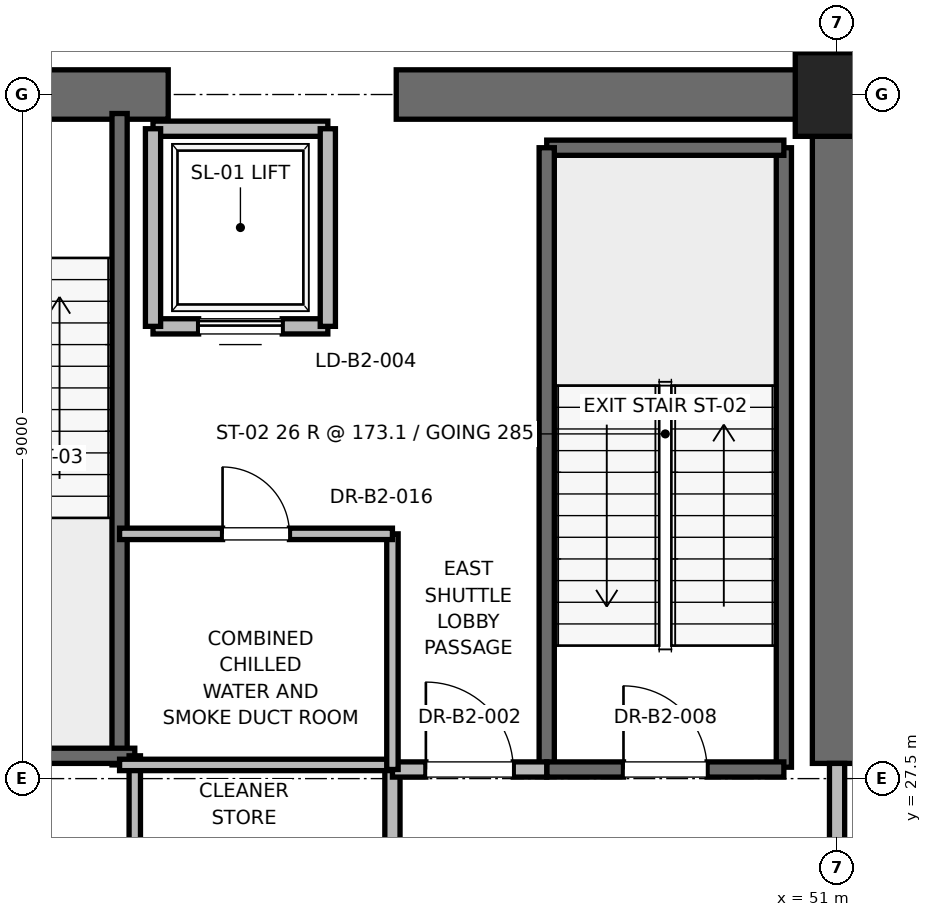
"""IFC4 building model, lengths in metres.
Left out: names, types, materials, properties, quantities, classifications, styles, units other than length and angle.
Written with IfcOpenShell. Run it as: python <this file> out.ifc"""

import sys

from ifc_helpers import new_model, si_unit, direction, frame, frame_2d, origin, origin_2d, place, context, subcontext, project, spatial, rectangle, extrude, element, fill, save


model = new_model("IFC4")
c1 = context("Model", 3, precision=1e-05, world=origin(), true_north=direction((0.0, 1.0)))
c2 = subcontext(c1, "Body", "Model", "MODEL_VIEW")
j1 = project(units=[si_unit("LENGTHUNIT", "METRE"), si_unit("PLANEANGLEUNIT", "RADIAN")], contexts=[c1])
p1 = place(None, origin())
s1 = spatial("IfcSite", under=j1, at=p1, CompositionType="ELEMENT")
p2 = place(p1, origin())
s2 = spatial("IfcBuilding", under=s1, at=p2, CompositionType="ELEMENT")
p3 = place(p2, frame((0.0, 0.0, -9.0)))
s3 = spatial("IfcBuildingStorey", under=s2, at=p3, CompositionType="ELEMENT", Elevation=-9.0)
p4 = place(p3, frame((51.0, 36.5, -0.3), z_axis=(0.0, 0.0, 1.0), x_axis=(1.0, 0.0, 0.0)))
e1 = element("IfcColumn", 1, at=p4, inside=s3, PredefinedType="PILASTER", context=c2, shape_type="SweptSolid", body=[
    extrude(rectangle(XDim=1.1, YDim=1.1, at=origin_2d()), origin(), (0.0, 0.0, 1.0), 4.8),
])
p5 = place(p3, frame((37.8, 36.5, -0.3), z_axis=(0.0, 0.0, 1.0), x_axis=(1.0, 0.0, 0.0)))
e2 = element("IfcWall", 2, at=p5, inside=s3, PredefinedType="SHEAR", context=c2, shape_type="SweptSolid", body=[
    extrude(rectangle(XDim=4.4, YDim=0.65, at=frame_2d((2.2, 0.0))), origin(), (0.0, 0.0, 1.0), 4.5),
])
p6 = place(p5, frame((1.65, 0.0, 0.3)))
e3 = element("IfcOpeningElement", 3, at=p6, cuts=e2, PredefinedType="OPENING", context=c2, shape_type="SweptSolid", body=[
    extrude(rectangle(XDim=1.1, YDim=2.15, at=frame_2d((0.55, 1.075))), frame((0.0, 0.325, 0.0), z_axis=(0.0, -1.0, 0.0), x_axis=(1.0, 0.0, 0.0)), (0.0, 0.0, 1.0), 0.65),
])
p7 = place(p3, frame((45.2, 36.5, -0.3), z_axis=(0.0, 0.0, 1.0), x_axis=(1.0, 0.0, 0.0)))
e4 = element("IfcWall", 4, at=p7, inside=s3, PredefinedType="SHEAR", context=c2, shape_type="SweptSolid", body=[
    extrude(rectangle(XDim=5.8, YDim=0.65, at=frame_2d((2.9, 0.0))), origin(), (0.0, 0.0, 1.0), 4.5),
])
p8 = place(p3, frame((51.0, 27.7, -0.3), z_axis=(0.0, 0.0, 1.0), x_axis=(0.0, 1.0, 0.0)))
e5 = element("IfcWall", 5, at=p8, inside=s3, PredefinedType="SHEAR", context=c2, shape_type="SweptSolid", body=[
    extrude(rectangle(XDim=8.8, YDim=0.65, at=frame_2d((4.4, 0.0))), origin(), (0.0, 0.0, 1.0), 4.5),
])
p9 = place(p3, frame((50.3, 27.65, -0.3), z_axis=(0.0, 0.0, 1.0), x_axis=(0.0, 1.0, 0.0)))
e6 = element("IfcWall", 6, at=p9, inside=s3, PredefinedType="SOLIDWALL", context=c2, shape_type="SweptSolid", body=[
    extrude(rectangle(XDim=8.15, YDim=0.2, at=frame_2d((4.075, 0.0))), origin(), (0.0, 0.0, 1.0), 4.5),
])
p10 = place(p3, frame((47.18, 35.8, -0.3), z_axis=(0.0, 0.0, 1.0), x_axis=(1.0, 0.0, 0.0)))
e7 = element("IfcWall", 7, at=p10, inside=s3, PredefinedType="SOLIDWALL", context=c2, shape_type="SweptSolid", body=[
    extrude(rectangle(XDim=3.12, YDim=0.2, at=frame_2d((1.56, 0.0))), origin(), (0.0, 0.0, 1.0), 4.5),
])
p11 = place(p3, frame((47.18, 27.62, -0.3), z_axis=(0.0, 0.0, 1.0), x_axis=(0.0, 1.0, 0.0)))
e8 = element("IfcWall", 8, at=p11, inside=s3, PredefinedType="SOLIDWALL", context=c2, shape_type="SweptSolid", body=[
    extrude(rectangle(XDim=8.18, YDim=0.2, at=frame_2d((4.09, 0.0))), origin(), (0.0, 0.0, 1.0), 4.5),
])
p12 = place(p3, frame((47.18, 27.62, -0.3), z_axis=(0.0, 0.0, 1.0), x_axis=(1.0, 0.0, 0.0)))
e9 = element("IfcWall", 9, at=p12, inside=s3, PredefinedType="SOLIDWALL", context=c2, shape_type="SweptSolid", body=[
    extrude(rectangle(XDim=3.12, YDim=0.2, at=frame_2d((1.56, 0.0))), origin(), (0.0, 0.0, 1.0), 4.5),
])
p13 = place(p12, frame((1.01, 0.0, 0.3)))
e10 = element("IfcOpeningElement", 10, at=p13, cuts=e9, PredefinedType="OPENING", context=c2, shape_type="SweptSolid", body=[
    extrude(rectangle(XDim=1.1, YDim=2.15, at=frame_2d((0.55, 1.075))), frame((0.0, 0.1, 0.0), z_axis=(0.0, -1.0, 0.0), x_axis=(1.0, 0.0, 0.0)), (0.0, 0.0, 1.0), 0.2),
])
p14 = place(p3, frame((41.56, 27.68, -0.3), z_axis=(0.0, 0.0, 1.0), x_axis=(0.0, 1.0, 0.0)))
e11 = element("IfcWall", 11, at=p14, inside=s3, PredefinedType="SOLIDWALL", context=c2, shape_type="SweptSolid", body=[
    extrude(rectangle(XDim=8.57, YDim=0.2, at=frame_2d((4.285, 0.0))), origin(), (0.0, 0.0, 1.0), 4.5),
])
p15 = place(p3, frame((38.44, 27.8, -0.3), z_axis=(0.0, 0.0, 1.0), x_axis=(1.0, 0.0, 0.0)))
e12 = element("IfcWall", 12, at=p15, inside=s3, PredefinedType="SOLIDWALL", context=c2, shape_type="SweptSolid", body=[
    extrude(rectangle(XDim=3.32, YDim=0.2, at=frame_2d((1.66, 0.0))), origin(), (0.0, 0.0, 1.0), 4.5),
])
p16 = place(p3, frame((45.15, 24.25, 0.0), z_axis=(0.0, 0.0, 1.0), x_axis=(0.0, 1.0, 0.0)))
e13 = element("IfcWall", 13, at=p16, inside=s3, PredefinedType="PARTITIONING", context=c2, shape_type="SweptSolid", body=[
    extrude(rectangle(XDim=3.37, YDim=0.2, at=frame_2d((1.685, 0.0))), origin(), (0.0, 0.0, 1.0), 4.2),
])
p17 = place(p3, frame((45.15, 27.62, 0.0), z_axis=(0.0, 0.0, 1.0), x_axis=(1.0, 0.0, 0.0)))
e14 = element("IfcWall", 14, at=p17, inside=s3, PredefinedType="PARTITIONING", context=c2, shape_type="SweptSolid", body=[
    extrude(rectangle(XDim=2.03, YDim=0.2, at=frame_2d((1.015, 0.0))), origin(), (0.0, 0.0, 1.0), 4.2),
])
p18 = place(p17, frame((0.44, 0.0, 0.0)))
e15 = element("IfcOpeningElement", 15, at=p18, cuts=e14, PredefinedType="OPENING", context=c2, shape_type="SweptSolid", body=[
    extrude(rectangle(XDim=1.15, YDim=2.2, at=frame_2d((0.575, 1.1))), frame((0.0, 0.1, 0.0), z_axis=(0.0, -1.0, 0.0), x_axis=(1.0, 0.0, 0.0)), (0.0, 0.0, 1.0), 0.2),
])
p19 = place(p3, frame((51.0, 24.3, 0.0), z_axis=(0.0, 0.0, 1.0), x_axis=(0.0, 1.0, 0.0)))
e16 = element("IfcWall", 16, at=p19, inside=s3, PredefinedType="PARTITIONING", context=c2, shape_type="SweptSolid", body=[
    extrude(rectangle(XDim=3.4, YDim=0.2, at=frame_2d((1.7, 0.0))), origin(), (0.0, 0.0, 1.0), 2.98),
])
p20 = place(p19, frame((1.125, 0.0, 0.0)))
e17 = element("IfcOpeningElement", 17, at=p20, cuts=e16, PredefinedType="OPENING", context=c2, shape_type="SweptSolid", body=[
    extrude(rectangle(XDim=1.15, YDim=2.2, at=frame_2d((0.575, 1.1))), frame((0.0, 0.1, 0.0), z_axis=(0.0, -1.0, 0.0), x_axis=(1.0, 0.0, 0.0)), (0.0, 0.0, 1.0), 0.2),
])
p21 = place(p3, frame((42.0, 33.45, 0.0), z_axis=(0.0, 0.0, 1.0), x_axis=(1.0, 0.0, 0.0)))
e18 = element("IfcWall", 18, at=p21, inside=s3, PredefinedType="SOLIDWALL", context=c2, shape_type="SweptSolid", body=[
    extrude(rectangle(XDim=2.3, YDim=0.2, at=frame_2d((1.15, 0.0))), origin(), (0.0, 0.0, 1.0), 4.2),
])
p22 = place(p21, frame((0.6, 0.0, 0.0)))
e19 = element("IfcOpeningElement", 19, at=p22, cuts=e18, PredefinedType="OPENING", context=c2, shape_type="SweptSolid", body=[
    extrude(rectangle(XDim=1.1, YDim=2.2, at=frame_2d((0.55, 1.1))), frame((0.0, 0.1, 0.0), z_axis=(0.0, -1.0, 0.0), x_axis=(1.0, 0.0, 0.0)), (0.0, 0.0, 1.0), 0.2),
])
p23 = place(p3, frame((44.3, 36.05, 0.0), z_axis=(0.0, 0.0, 1.0), x_axis=(-1.0, 0.0, 0.0)))
e20 = element("IfcWall", 20, at=p23, inside=s3, PredefinedType="SOLIDWALL", context=c2, shape_type="SweptSolid", body=[
    extrude(rectangle(XDim=2.3, YDim=0.2, at=frame_2d((1.15, 0.0))), origin(), (0.0, 0.0, 1.0), 2.98),
])
for number, where, z_axis, x_axis in (
    (21, (42.0, 36.05, 0.0), (0.0, 0.0, 1.0), (0.0, -1.0, 0.0)),
    (22, (44.3, 33.45, 0.0), (0.0, 0.0, 1.0), (0.0, 1.0, 0.0)),
):
    element("IfcWall", number, at=place(p3, frame(where, z_axis=z_axis, x_axis=x_axis)), inside=s3, PredefinedType="SOLIDWALL", context=c2, shape_type="SweptSolid", body=[
        extrude(rectangle(XDim=2.6, YDim=0.2, at=frame_2d((1.3, 0.0))), origin(), (0.0, 0.0, 1.0), 2.98),
    ])
p24 = place(p3, frame((41.76, 23.8, 0.0), z_axis=(0.0, 0.0, 1.0), x_axis=(0.0, 1.0, 0.0)))
e23 = element("IfcWall", 23, at=p24, inside=s3, PredefinedType="PARTITIONING", context=c2, shape_type="SweptSolid", body=[
    extrude(rectangle(XDim=4.0, YDim=0.15, at=frame_2d((2.0, 0.0))), origin(), (0.0, 0.0, 1.0), 2.85),
])
p25 = place(p3, frame((41.56, 27.68, 0.0), z_axis=(0.0, 0.0, 1.0), x_axis=(1.0, 0.0, 0.0)))
e24 = element("IfcWall", 24, at=p25, inside=s3, PredefinedType="PARTITIONING", context=c2, shape_type="SweptSolid", body=[
    extrude(rectangle(XDim=3.59, YDim=0.15, at=frame_2d((1.795, 0.0))), origin(), (0.0, 0.0, 1.0), 2.85),
])
p26 = place(p3, frame((45.15, 27.62, 0.0), z_axis=(0.0, 0.0, 1.0), x_axis=(0.0, 1.0, 0.0)))
e25 = element("IfcWall", 25, at=p26, inside=s3, PredefinedType="PARTITIONING", context=c2, shape_type="SweptSolid", body=[
    extrude(rectangle(XDim=3.1, YDim=0.15, at=frame_2d((1.55, 0.0))), origin(), (0.0, 0.0, 1.0), 2.85),
])
p27 = place(p3, frame((41.56, 30.72, 0.0), z_axis=(0.0, 0.0, 1.0), x_axis=(1.0, 0.0, 0.0)))
e26 = element("IfcWall", 26, at=p27, inside=s3, PredefinedType="PARTITIONING", context=c2, shape_type="SweptSolid", body=[
    extrude(rectangle(XDim=3.59, YDim=0.15, at=frame_2d((1.795, 0.0))), origin(), (0.0, 0.0, 1.0), 2.85),
])
p28 = place(p27, frame((1.355, 0.0, 0.0)))
e27 = element("IfcOpeningElement", 27, at=p28, cuts=e26, PredefinedType="OPENING", context=c2, shape_type="SweptSolid", body=[
    extrude(rectangle(XDim=0.88, YDim=2.1, at=frame_2d((0.44, 1.05))), frame((0.0, 0.075, 0.0), z_axis=(0.0, -1.0, 0.0), x_axis=(1.0, 0.0, 0.0)), (0.0, 0.0, 1.0), 0.15),
])
p29 = place(p13, origin())
e28 = element("IfcDoor", 28, at=p29, inside=s3, OperationType="SINGLE_SWING_LEFT", PredefinedType="DOOR", context=c2, shape_type="SweptSolid", body=[
    extrude(rectangle(XDim=1.1, YDim=2.15, at=frame_2d((0.55, 1.075))), frame((0.0, 0.025, 0.0), z_axis=(0.0, -1.0, 0.0), x_axis=(1.0, 0.0, 0.0)), (0.0, 0.0, 1.0), 0.05),
])
fill(e10, e28)
p30 = place(p18, origin())
e29 = element("IfcDoor", 29, at=p30, inside=s3, OperationType="SINGLE_SWING_LEFT", PredefinedType="DOOR", context=c2, shape_type="SweptSolid", body=[
    extrude(rectangle(XDim=1.15, YDim=2.2, at=frame_2d((0.575, 1.1))), frame((0.0, 0.025, 0.0), z_axis=(0.0, -1.0, 0.0), x_axis=(1.0, 0.0, 0.0)), (0.0, 0.0, 1.0), 0.05),
])
fill(e15, e29)
p31 = place(p22, origin())
e30 = element("IfcDoor", 30, at=p31, inside=s3, OperationType="SLIDING_TO_RIGHT", PredefinedType="DOOR", context=c2, shape_type="SweptSolid", body=[
    extrude(rectangle(XDim=1.1, YDim=2.2, at=frame_2d((0.55, 1.1))), frame((0.0, 0.025, 0.0), z_axis=(0.0, -1.0, 0.0), x_axis=(1.0, 0.0, 0.0)), (0.0, 0.0, 1.0), 0.05),
])
fill(e19, e30)
p32 = place(p28, origin())
e31 = element("IfcDoor", 31, at=p32, inside=s3, OperationType="SINGLE_SWING_LEFT", PredefinedType="DOOR", context=c2, shape_type="SweptSolid", body=[
    extrude(rectangle(XDim=0.88, YDim=2.1, at=frame_2d((0.44, 1.05))), frame((0.0, 0.025, 0.0), z_axis=(0.0, -1.0, 0.0), x_axis=(1.0, 0.0, 0.0)), (0.0, 0.0, 1.0), 0.05),
])
fill(e27, e31)
save(model, sys.argv[1])
